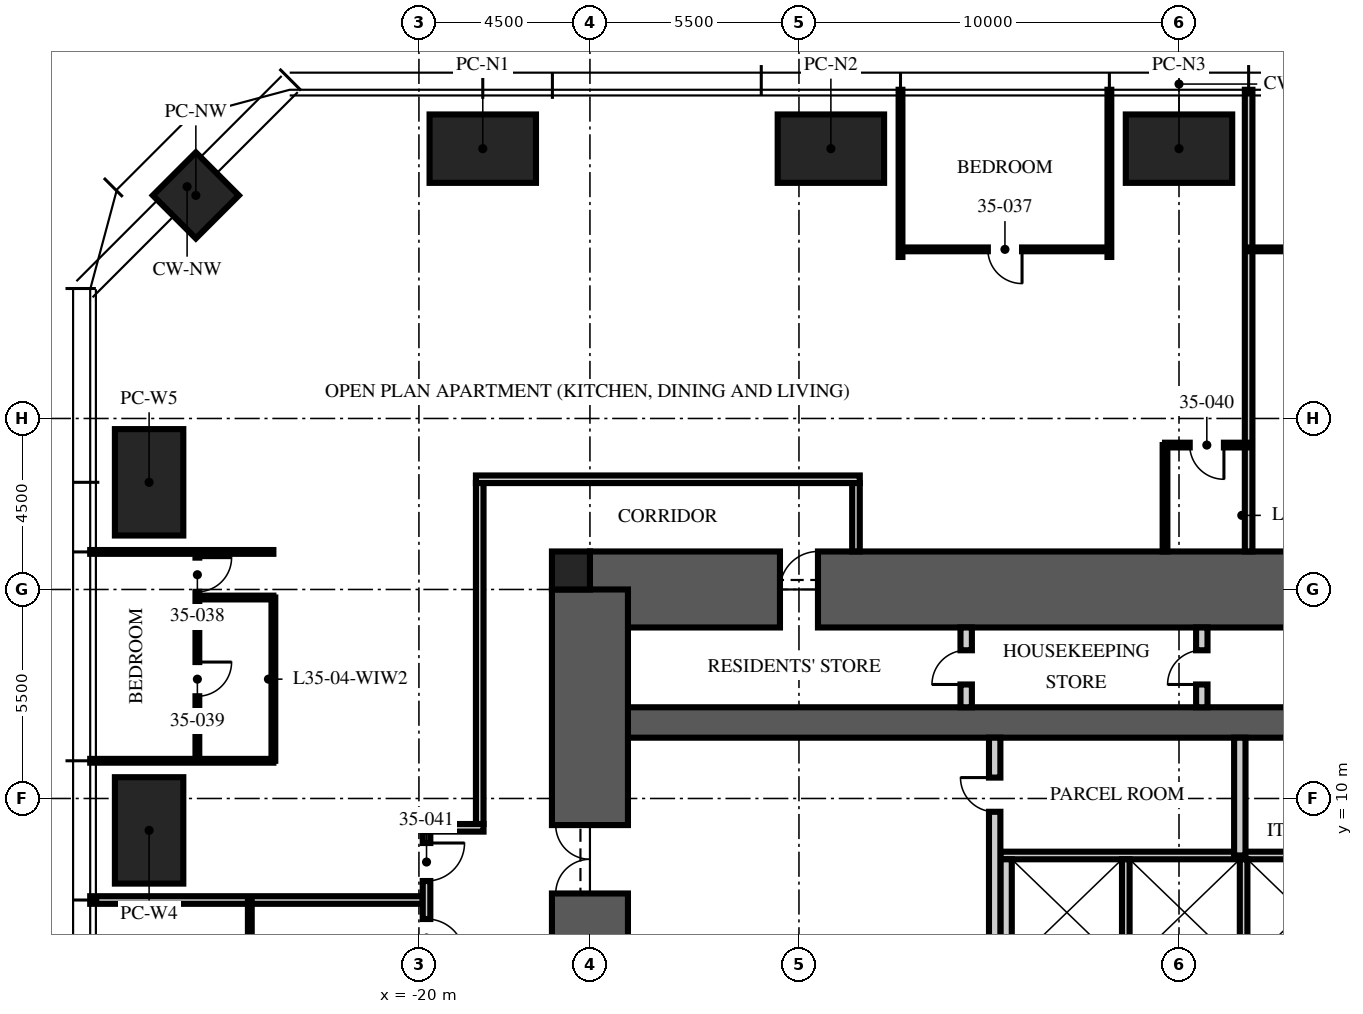
"""IFC4 building model, lengths in metres.
Left out: names, types, materials, properties, quantities, classifications, styles, units other than length and angle.
Written with IfcOpenShell. Run it as: python <this file> out.ifc"""

import sys

from ifc_helpers import new_model, si_unit, direction, frame, frame_2d, origin, origin_2d, place, context, subcontext, project, spatial, rectangle, extrude, element, fill, save


model = new_model("IFC4")
c1 = context("Model", 3, precision=1e-05, world=origin(), true_north=direction((0.0, 1.0)))
c2 = subcontext(c1, "Body", "Model", "MODEL_VIEW")
j1 = project(units=[si_unit("LENGTHUNIT", "METRE"), si_unit("PLANEANGLEUNIT", "RADIAN")], contexts=[c1])
p1 = place(None, origin())
s1 = spatial("IfcSite", under=j1, at=p1, CompositionType="ELEMENT")
p2 = place(p1, origin())
s2 = spatial("IfcBuilding", under=s1, at=p2, CompositionType="ELEMENT")
p3 = place(p2, frame((0.0, 0.0, 141.0)))
s3 = spatial("IfcBuildingStorey", under=s2, at=p3, CompositionType="ELEMENT", Elevation=141.0)
p4 = place(p3, frame((-15.5, 15.5, -0.25), z_axis=(0.0, 0.0, 1.0), x_axis=(1.0, 0.0, 0.0)))
e1 = element("IfcWall", 1, at=p4, inside=s3, PredefinedType="SHEAR", context=c2, shape_type="SweptSolid", body=[
    extrude(rectangle(XDim=31.0, YDim=2.0, at=frame_2d((15.5, 0.0))), origin(), (0.0, 0.0, 1.0), 3.75),
])
p5 = place(p4, frame((5.0, 0.0, 0.25)))
e2 = element("IfcOpeningElement", 2, at=p5, cuts=e1, PredefinedType="OPENING", context=c2, shape_type="SweptSolid", body=[
    extrude(rectangle(XDim=1.0, YDim=2.1, at=frame_2d((0.5, 1.05))), frame((0.0, 1.01, 0.0), z_axis=(0.0, -1.0, 0.0), x_axis=(1.0, 0.0, 0.0)), (0.0, 0.0, 1.0), 2.02),
])
p6 = place(p3, frame((-15.5, 12.0, -0.25), z_axis=(0.0, 0.0, 1.0), x_axis=(1.0, 0.0, 0.0)))
e3 = element("IfcWall", 3, at=p6, inside=s3, PredefinedType="SHEAR", context=c2, shape_type="SweptSolid", body=[
    extrude(rectangle(XDim=31.0, YDim=0.8, at=frame_2d((15.5, 0.0))), origin(), (0.0, 0.0, 1.0), 3.75),
])
p7 = place(p3, frame((-15.5, -15.5, -0.25), z_axis=(0.0, 0.0, 1.0), x_axis=(0.0, 1.0, 0.0)))
e4 = element("IfcWall", 4, at=p7, inside=s3, PredefinedType="SHEAR", context=c2, shape_type="SweptSolid", body=[
    extrude(rectangle(XDim=31.0, YDim=2.0, at=frame_2d((15.5, 0.0))), origin(), (0.0, 0.0, 1.0), 3.75),
])
p8 = place(p7, frame((6.5, 0.0, 0.25)))
e5 = element("IfcOpeningElement", 5, at=p8, cuts=e4, PredefinedType="OPENING", context=c2, shape_type="SweptSolid", body=[
    extrude(rectangle(XDim=1.2, YDim=2.1, at=frame_2d((0.6, 1.05))), frame((0.0, 1.01, 0.0), z_axis=(0.0, -1.0, 0.0), x_axis=(1.0, 0.0, 0.0)), (0.0, 0.0, 1.0), 2.02),
])
p9 = place(p7, frame((23.0, 0.0, 0.25)))
e6 = element("IfcOpeningElement", 6, at=p9, cuts=e4, PredefinedType="OPENING", context=c2, shape_type="SweptSolid", body=[
    extrude(rectangle(XDim=1.8, YDim=2.1, at=frame_2d((0.9, 1.05))), frame((0.0, 1.01, 0.0), z_axis=(0.0, -1.0, 0.0), x_axis=(1.0, 0.0, 0.0)), (0.0, 0.0, 1.0), 2.02),
])
p10 = place(p3, frame((-16.0, 16.0, -0.25), z_axis=(0.0, 0.0, 1.0), x_axis=(1.0, 0.0, 0.0)))
e7 = element("IfcColumn", 7, at=p10, inside=s3, PredefinedType="COLUMN", context=c2, shape_type="SweptSolid", body=[
    extrude(rectangle(XDim=1.0, YDim=1.0, at=origin_2d()), origin(), (0.0, 0.0, 1.0), 3.75),
])
for number, where, z_axis, x_axis in (
    (8, (-18.32, 27.1, 0.0), (0.0, 0.0, 1.0), (1.0, 0.0, 0.0)),
    (9, (-9.16, 27.1, 0.0), (0.0, 0.0, 1.0), (1.0, 0.0, 0.0)),
    (10, (0.0, 27.1, 0.0), (0.0, 0.0, 1.0), (1.0, 0.0, 0.0)),
    (11, (-27.1, 9.16, 0.0), (0.0, 0.0, 1.0), (0.0, 1.0, 0.0)),
    (12, (-27.1, 18.32, 0.0), (0.0, 0.0, 1.0), (0.0, 1.0, 0.0)),
):
    element("IfcColumn", number, at=place(p3, frame(where, z_axis=z_axis, x_axis=x_axis)), inside=s3, PredefinedType="COLUMN", context=c2, shape_type="SweptSolid", body=[
        extrude(rectangle(XDim=2.8, YDim=1.8, at=origin_2d()), origin(), (0.0, 0.0, 1.0), 3.75),
    ])
p11 = place(p3, frame((-25.87, 25.87, 0.0), z_axis=(0.0, 0.0, 1.0), x_axis=(0.707106781187, 0.707106781187, 0.0)))
e13 = element("IfcColumn", 13, at=p11, inside=s3, PredefinedType="COLUMN", context=c2, shape_type="SweptSolid", body=[
    extrude(rectangle(XDim=1.6, YDim=1.6, at=origin_2d()), origin(), (0.0, 0.0, 1.0), 3.75),
])
p12 = place(p3, frame((-4.7, 8.5, 0.0), z_axis=(0.0, 0.0, 1.0), x_axis=(1.0, 0.0, 0.0)))
e14 = element("IfcWall", 14, at=p12, inside=s3, PredefinedType="PARTITIONING", context=c2, shape_type="SweptSolid", body=[
    extrude(rectangle(XDim=9.7, YDim=0.2, at=frame_2d((4.85, 0.0))), origin(), (0.0, 0.0, 1.0), 3.5),
])
p13 = place(p3, frame((-4.55, 5.6, 0.0), z_axis=(0.0, 0.0, 1.0), x_axis=(0.0, 1.0, 0.0)))
e15 = element("IfcWall", 15, at=p13, inside=s3, PredefinedType="PARTITIONING", context=c2, shape_type="SweptSolid", body=[
    extrude(rectangle(XDim=2.8, YDim=0.3, at=frame_2d((1.4, 0.0))), origin(), (0.0, 0.0, 1.0), 3.5),
])
for number, where, z_axis, x_axis in (
    (16, (-1.4, 5.6, 0.0), (0.0, 0.0, 1.0), (0.0, 1.0, 0.0)),
    (17, (1.7, 5.6, 0.0), (0.0, 0.0, 1.0), (0.0, 1.0, 0.0)),
):
    element("IfcWall", number, at=place(p3, frame(where, z_axis=z_axis, x_axis=x_axis)), inside=s3, PredefinedType="PARTITIONING", context=c2, shape_type="SweptSolid", body=[
        extrude(rectangle(XDim=2.8, YDim=0.2, at=frame_2d((1.4, 0.0))), origin(), (0.0, 0.0, 1.0), 3.5),
    ])
p14 = place(p3, frame((-4.85, 5.3, 0.0), z_axis=(0.0, 0.0, 1.0), x_axis=(0.0, 1.0, 0.0)))
e18 = element("IfcWall", 18, at=p14, inside=s3, PredefinedType="PARTITIONING", context=c2, shape_type="SweptSolid", body=[
    extrude(rectangle(XDim=6.3, YDim=0.3, at=frame_2d((3.15, 0.0))), origin(), (0.0, 0.0, 1.0), 3.5),
])
p15 = place(p14, frame((4.35, 0.0, 0.0)))
e19 = element("IfcOpeningElement", 19, at=p15, cuts=e18, PredefinedType="OPENING", context=c2, shape_type="SweptSolid", body=[
    extrude(rectangle(XDim=0.9, YDim=2.1, at=frame_2d((0.45, 1.05))), frame((0.0, 0.16, 0.0), z_axis=(0.0, -1.0, 0.0), x_axis=(1.0, 0.0, 0.0)), (0.0, 0.0, 1.0), 0.32),
])
p16 = place(p3, frame((1.6, 8.5, 0.0), z_axis=(0.0, 0.0, 1.0), x_axis=(0.0, 1.0, 0.0)))
e20 = element("IfcWall", 20, at=p16, inside=s3, PredefinedType="PARTITIONING", context=c2, shape_type="SweptSolid", body=[
    extrude(rectangle(XDim=3.1, YDim=0.3, at=frame_2d((1.55, 0.0))), origin(), (0.0, 0.0, 1.0), 3.5),
])
p17 = place(p3, frame((-5.6, 12.4, 0.0), z_axis=(0.0, 0.0, 1.0), x_axis=(0.0, 1.0, 0.0)))
e21 = element("IfcWall", 21, at=p17, inside=s3, PredefinedType="PARTITIONING", context=c2, shape_type="SweptSolid", body=[
    extrude(rectangle(XDim=2.1, YDim=0.3, at=frame_2d((1.05, 0.0))), origin(), (0.0, 0.0, 1.0), 3.5),
])
p18 = place(p17, frame((0.6, 0.0, 0.0)))
e22 = element("IfcOpeningElement", 22, at=p18, cuts=e21, PredefinedType="OPENING", context=c2, shape_type="SweptSolid", body=[
    extrude(rectangle(XDim=0.9, YDim=2.1, at=frame_2d((0.45, 1.05))), frame((0.0, 0.16, 0.0), z_axis=(0.0, -1.0, 0.0), x_axis=(1.0, 0.0, 0.0)), (0.0, 0.0, 1.0), 0.32),
])
p19 = place(p3, frame((0.6, 12.4, 0.0), z_axis=(0.0, 0.0, 1.0), x_axis=(0.0, 1.0, 0.0)))
e23 = element("IfcWall", 23, at=p19, inside=s3, PredefinedType="PARTITIONING", context=c2, shape_type="SweptSolid", body=[
    extrude(rectangle(XDim=2.1, YDim=0.3, at=frame_2d((1.05, 0.0))), origin(), (0.0, 0.0, 1.0), 3.5),
])
p20 = place(p19, frame((0.6, 0.0, 0.0)))
e24 = element("IfcOpeningElement", 24, at=p20, cuts=e23, PredefinedType="OPENING", context=c2, shape_type="SweptSolid", body=[
    extrude(rectangle(XDim=0.9, YDim=2.1, at=frame_2d((0.45, 1.05))), frame((0.0, 0.16, 0.0), z_axis=(0.0, -1.0, 0.0), x_axis=(1.0, 0.0, 0.0)), (0.0, 0.0, 1.0), 0.32),
])
p21 = place(p3, frame((-18.5, 18.4, 0.0), z_axis=(0.0, 0.0, 1.0), x_axis=(1.0, 0.0, 0.0)))
e25 = element("IfcWall", 25, at=p21, inside=s3, PredefinedType="PARTITIONING", context=c2, shape_type="SweptSolid", body=[
    extrude(rectangle(XDim=10.1, YDim=0.2, at=frame_2d((5.05, 0.0))), origin(), (0.0, 0.0, 1.0), 2.3),
])
p22 = place(p3, frame((-8.5, 18.3, 0.0), z_axis=(0.0, 0.0, 1.0), x_axis=(0.0, -1.0, 0.0)))
e26 = element("IfcWall", 26, at=p22, inside=s3, PredefinedType="PARTITIONING", context=c2, shape_type="SweptSolid", body=[
    extrude(rectangle(XDim=1.8, YDim=0.2, at=frame_2d((0.9, 0.0))), origin(), (0.0, 0.0, 1.0), 3.5),
])
p23 = place(p3, frame((1.832, 16.5, 0.0), z_axis=(0.0, 0.0, 1.0), x_axis=(0.0, 1.0, 0.0)))
e27 = element("IfcWall", 27, at=p23, inside=s3, PredefinedType="PARTITIONING", context=c2, shape_type="SweptSolid", body=[
    extrude(rectangle(XDim=12.15, YDim=0.2, at=frame_2d((6.075, 0.0))), origin(), (0.0, 0.0, 1.0), 2.81),
])
for number, where, z_axis, x_axis in (
    (28, (-1.832, 24.25, 0.0), (0.0, 0.0, 1.0), (0.0, 1.0, 0.0)),
    (29, (-7.328, 24.25, 0.0), (0.0, 0.0, 1.0), (0.0, 1.0, 0.0)),
):
    element("IfcWall", number, at=place(p3, frame(where, z_axis=z_axis, x_axis=x_axis)), inside=s3, PredefinedType="PARTITIONING", context=c2, shape_type="SweptSolid", body=[
        extrude(rectangle(XDim=4.4, YDim=0.1, at=frame_2d((2.2, 0.0))), origin(), (0.0, 0.0, 1.0), 2.81),
    ])
for number, where, z_axis, x_axis in (
    (30, (-23.83, 16.488, 0.0), (0.0, 0.0, 1.0), (-1.0, 0.0, 0.0)),
    (31, (-23.83, 10.992, 0.0), (0.0, 0.0, 1.0), (-1.0, 0.0, 0.0)),
):
    element("IfcWall", number, at=place(p3, frame(where, z_axis=z_axis, x_axis=x_axis)), inside=s3, PredefinedType="PARTITIONING", context=c2, shape_type="SweptSolid", body=[
        extrude(rectangle(XDim=4.82, YDim=0.1, at=frame_2d((2.41, 0.0))), origin(), (0.0, 0.0, 1.0), 2.81),
    ])
p24 = place(p3, frame((-19.9, 7.328, 0.0), z_axis=(0.0, 0.0, 1.0), x_axis=(-1.0, 0.0, 0.0)))
e32 = element("IfcWall", 32, at=p24, inside=s3, PredefinedType="PARTITIONING", context=c2, shape_type="SweptSolid", body=[
    extrude(rectangle(XDim=8.75, YDim=0.2, at=frame_2d((4.375, 0.0))), origin(), (0.0, 0.0, 1.0), 2.81),
])
p25 = place(p3, frame((7.328, 24.45, 0.0), z_axis=(0.0, 0.0, 1.0), x_axis=(-1.0, 0.0, 0.0)))
e33 = element("IfcWall", 33, at=p25, inside=s3, PredefinedType="PARTITIONING", context=c2, shape_type="SweptSolid", body=[
    extrude(rectangle(XDim=5.496, YDim=0.1, at=frame_2d((2.748, 0.0))), origin(), (0.0, 0.0, 1.0), 2.81),
])
p26 = place(p25, frame((2.298, 0.0, 0.0)))
e34 = element("IfcOpeningElement", 34, at=p26, cuts=e33, PredefinedType="OPENING", context=c2, shape_type="SweptSolid", body=[
    extrude(rectangle(XDim=0.9, YDim=2.1, at=frame_2d((0.45, 1.05))), frame((0.0, 0.06, 0.0), z_axis=(0.0, -1.0, 0.0), x_axis=(1.0, 0.0, 0.0)), (0.0, 0.0, 1.0), 0.12),
])
p27 = place(p3, frame((-1.832, 24.45, 0.0), z_axis=(0.0, 0.0, 1.0), x_axis=(-1.0, 0.0, 0.0)))
e35 = element("IfcWall", 35, at=p27, inside=s3, PredefinedType="PARTITIONING", context=c2, shape_type="SweptSolid", body=[
    extrude(rectangle(XDim=5.496, YDim=0.1, at=frame_2d((2.748, 0.0))), origin(), (0.0, 0.0, 1.0), 2.81),
])
p28 = place(p27, frame((2.298, 0.0, 0.0)))
e36 = element("IfcOpeningElement", 36, at=p28, cuts=e35, PredefinedType="OPENING", context=c2, shape_type="SweptSolid", body=[
    extrude(rectangle(XDim=0.9, YDim=2.1, at=frame_2d((0.45, 1.05))), frame((0.0, 0.06, 0.0), z_axis=(0.0, -1.0, 0.0), x_axis=(1.0, 0.0, 0.0)), (0.0, 0.0, 1.0), 0.12),
])
p29 = place(p3, frame((-25.83, 16.488, 0.0), z_axis=(0.0, 0.0, 1.0), x_axis=(0.0, -1.0, 0.0)))
e37 = element("IfcWall", 37, at=p29, inside=s3, PredefinedType="PARTITIONING", context=c2, shape_type="SweptSolid", body=[
    extrude(rectangle(XDim=5.496, YDim=0.1, at=frame_2d((2.748, 0.0))), origin(), (0.0, 0.0, 1.0), 2.81),
])
p30 = place(p29, frame((0.15, 0.0, 0.0)))
e38 = element("IfcOpeningElement", 38, at=p30, cuts=e37, PredefinedType="OPENING", context=c2, shape_type="SweptSolid", body=[
    extrude(rectangle(XDim=0.9, YDim=2.1, at=frame_2d((0.45, 1.05))), frame((0.0, 0.06, 0.0), z_axis=(0.0, -1.0, 0.0), x_axis=(1.0, 0.0, 0.0)), (0.0, 0.0, 1.0), 0.12),
])
p31 = place(p29, frame((2.898, 0.0, 0.0)))
e39 = element("IfcOpeningElement", 39, at=p31, cuts=e37, PredefinedType="OPENING", context=c2, shape_type="SweptSolid", body=[
    extrude(rectangle(XDim=0.9, YDim=2.1, at=frame_2d((0.45, 1.05))), frame((0.0, 0.06, 0.0), z_axis=(0.0, -1.0, 0.0), x_axis=(1.0, 0.0, 0.0)), (0.0, 0.0, 1.0), 0.12),
])
p32 = place(p3, frame((-23.83, 15.288, 0.0), z_axis=(0.0, 0.0, 1.0), x_axis=(-1.0, 0.0, 0.0)))
e40 = element("IfcWall", 40, at=p32, inside=s3, PredefinedType="PARTITIONING", context=c2, shape_type="SweptSolid", body=[
    extrude(rectangle(XDim=2.0, YDim=0.1, at=frame_2d((1.0, 0.0))), origin(), (0.0, 0.0, 1.0), 3.5),
])
p33 = place(p3, frame((-23.83, 15.288, 0.0), z_axis=(0.0, 0.0, 1.0), x_axis=(0.0, -1.0, 0.0)))
e41 = element("IfcWall", 41, at=p33, inside=s3, PredefinedType="PARTITIONING", context=c2, shape_type="SweptSolid", body=[
    extrude(rectangle(XDim=4.296, YDim=0.1, at=frame_2d((2.148, 0.0))), origin(), (0.0, 0.0, 1.0), 2.81),
])
p34 = place(p3, frame((1.832, 19.3, 0.0), z_axis=(0.0, 0.0, 1.0), x_axis=(-1.0, 0.0, 0.0)))
e42 = element("IfcWall", 42, at=p34, inside=s3, PredefinedType="PARTITIONING", context=c2, shape_type="SweptSolid", body=[
    extrude(rectangle(XDim=2.2, YDim=0.125, at=frame_2d((1.1, 0.0))), origin(), (0.0, 0.0, 1.0), 2.7),
])
p35 = place(p34, frame((0.65, 0.0, 0.0)))
e43 = element("IfcOpeningElement", 43, at=p35, cuts=e42, PredefinedType="OPENING", context=c2, shape_type="SweptSolid", body=[
    extrude(rectangle(XDim=0.9, YDim=2.1, at=frame_2d((0.45, 1.05))), frame((0.0, 0.073, 0.0), z_axis=(0.0, -1.0, 0.0), x_axis=(1.0, 0.0, 0.0)), (0.0, 0.0, 1.0), 0.145),
])
p36 = place(p3, frame((-0.368, 16.5, 0.0), z_axis=(0.0, 0.0, 1.0), x_axis=(0.0, 1.0, 0.0)))
e44 = element("IfcWall", 44, at=p36, inside=s3, PredefinedType="PARTITIONING", context=c2, shape_type="SweptSolid", body=[
    extrude(rectangle(XDim=2.8, YDim=0.125, at=frame_2d((1.4, 0.0))), origin(), (0.0, 0.0, 1.0), 3.5),
])
p37 = place(p3, frame((-24.45, 7.328, 0.0), z_axis=(0.0, 0.0, 1.0), x_axis=(0.0, -1.0, 0.0)))
e45 = element("IfcWall", 45, at=p37, inside=s3, PredefinedType="PARTITIONING", context=c2, shape_type="SweptSolid", body=[
    extrude(rectangle(XDim=5.496, YDim=0.1, at=frame_2d((2.748, 0.0))), origin(), (0.0, 0.0, 1.0), 2.81),
])
p38 = place(p37, frame((2.298, 0.0, 0.0)))
e46 = element("IfcOpeningElement", 46, at=p38, cuts=e45, PredefinedType="OPENING", context=c2, shape_type="SweptSolid", body=[
    extrude(rectangle(XDim=0.9, YDim=2.1, at=frame_2d((0.45, 1.05))), frame((0.0, 0.06, 0.0), z_axis=(0.0, -1.0, 0.0), x_axis=(1.0, 0.0, 0.0)), (0.0, 0.0, 1.0), 0.12),
])
p39 = place(p3, frame((-18.4, 18.3, 0.0), z_axis=(0.0, 0.0, 1.0), x_axis=(0.0, -1.0, 0.0)))
e47 = element("IfcWall", 47, at=p39, inside=s3, PredefinedType="PARTITIONING", context=c2, shape_type="SweptSolid", body=[
    extrude(rectangle(XDim=8.972, YDim=0.2, at=frame_2d((4.486, 0.0))), origin(), (0.0, 0.0, 1.0), 2.3),
])
p40 = place(p3, frame((-18.3, 9.228, 0.0), z_axis=(0.0, 0.0, 1.0), x_axis=(-1.0, 0.0, 0.0)))
e48 = element("IfcWall", 48, at=p40, inside=s3, PredefinedType="PARTITIONING", context=c2, shape_type="SweptSolid", body=[
    extrude(rectangle(XDim=1.6, YDim=0.2, at=frame_2d((0.8, 0.0))), origin(), (0.0, 0.0, 1.0), 2.7),
])
p41 = place(p3, frame((-19.8, 9.128, 0.0), z_axis=(0.0, 0.0, 1.0), x_axis=(0.0, -1.0, 0.0)))
e49 = element("IfcWall", 49, at=p41, inside=s3, PredefinedType="PARTITIONING", context=c2, shape_type="SweptSolid", body=[
    extrude(rectangle(XDim=3.6, YDim=0.2, at=frame_2d((1.8, 0.0))), origin(), (0.0, 0.0, 1.0), 2.7),
])
p42 = place(p41, frame((0.3, 0.0, 0.0)))
e50 = element("IfcOpeningElement", 50, at=p42, cuts=e49, PredefinedType="OPENING", context=c2, shape_type="SweptSolid", body=[
    extrude(rectangle(XDim=1.0, YDim=2.2, at=frame_2d((0.5, 1.1))), frame((0.0, 0.11, 0.0), z_axis=(0.0, -1.0, 0.0), x_axis=(1.0, 0.0, 0.0)), (0.0, 0.0, 1.0), 0.22),
])
p43 = place(p41, frame((2.3, 0.0, 0.0)))
e51 = element("IfcOpeningElement", 51, at=p43, cuts=e49, PredefinedType="OPENING", context=c2, shape_type="SweptSolid", body=[
    extrude(rectangle(XDim=1.0, YDim=2.2, at=frame_2d((0.5, 1.1))), frame((0.0, 0.11, 0.0), z_axis=(0.0, -1.0, 0.0), x_axis=(1.0, 0.0, 0.0)), (0.0, 0.0, 1.0), 0.22),
])
p44 = place(p9, origin())
e52 = element("IfcDoor", 52, at=p44, inside=s3, OperationType="DOUBLE_DOOR_SINGLE_SWING", PredefinedType="DOOR", context=c2, shape_type="SweptSolid", body=[
    extrude(rectangle(XDim=1.8, YDim=2.1, at=frame_2d((0.9, 1.05))), frame((0.0, 0.025, 0.0), z_axis=(0.0, -1.0, 0.0), x_axis=(1.0, 0.0, 0.0)), (0.0, 0.0, 1.0), 0.05),
])
fill(e6, e52)
p45 = place(p15, origin())
e53 = element("IfcDoor", 53, at=p45, inside=s3, OperationType="SINGLE_SWING_RIGHT", PredefinedType="DOOR", context=c2, shape_type="SweptSolid", body=[
    extrude(rectangle(XDim=0.9, YDim=2.1, at=frame_2d((0.45, 1.05))), frame((0.0, 0.025, 0.0), z_axis=(0.0, -1.0, 0.0), x_axis=(1.0, 0.0, 0.0)), (0.0, 0.0, 1.0), 0.05),
])
fill(e19, e53)
p46 = place(p18, origin())
e54 = element("IfcDoor", 54, at=p46, inside=s3, OperationType="SINGLE_SWING_LEFT", PredefinedType="DOOR", context=c2, shape_type="SweptSolid", body=[
    extrude(rectangle(XDim=0.9, YDim=2.1, at=frame_2d((0.45, 1.05))), frame((0.0, 0.025, 0.0), z_axis=(0.0, -1.0, 0.0), x_axis=(1.0, 0.0, 0.0)), (0.0, 0.0, 1.0), 0.05),
])
fill(e22, e54)
p47 = place(p20, origin())
e55 = element("IfcDoor", 55, at=p47, inside=s3, OperationType="SINGLE_SWING_LEFT", PredefinedType="DOOR", context=c2, shape_type="SweptSolid", body=[
    extrude(rectangle(XDim=0.9, YDim=2.1, at=frame_2d((0.45, 1.05))), frame((0.0, 0.025, 0.0), z_axis=(0.0, -1.0, 0.0), x_axis=(1.0, 0.0, 0.0)), (0.0, 0.0, 1.0), 0.05),
])
fill(e24, e55)
p48 = place(p5, origin())
e56 = element("IfcDoor", 56, at=p48, inside=s3, OperationType="SINGLE_SWING_RIGHT", PredefinedType="DOOR", context=c2, shape_type="SweptSolid", body=[
    extrude(rectangle(XDim=1.0, YDim=2.1, at=frame_2d((0.5, 1.05))), frame((0.0, 0.025, 0.0), z_axis=(0.0, -1.0, 0.0), x_axis=(1.0, 0.0, 0.0)), (0.0, 0.0, 1.0), 0.05),
])
fill(e2, e56)
p49 = place(p28, origin())
e57 = element("IfcDoor", 57, at=p49, inside=s3, OperationType="SINGLE_SWING_LEFT", PredefinedType="DOOR", context=c2, shape_type="SweptSolid", body=[
    extrude(rectangle(XDim=0.9, YDim=2.1, at=frame_2d((0.45, 1.05))), frame((0.0, 0.025, 0.0), z_axis=(0.0, -1.0, 0.0), x_axis=(1.0, 0.0, 0.0)), (0.0, 0.0, 1.0), 0.05),
])
fill(e36, e57)
p50 = place(p30, origin())
e58 = element("IfcDoor", 58, at=p50, inside=s3, OperationType="SINGLE_SWING_LEFT", PredefinedType="DOOR", context=c2, shape_type="SweptSolid", body=[
    extrude(rectangle(XDim=0.9, YDim=2.1, at=frame_2d((0.45, 1.05))), frame((0.0, 0.025, 0.0), z_axis=(0.0, -1.0, 0.0), x_axis=(1.0, 0.0, 0.0)), (0.0, 0.0, 1.0), 0.05),
])
fill(e38, e58)
p51 = place(p31, origin())
e59 = element("IfcDoor", 59, at=p51, inside=s3, OperationType="SINGLE_SWING_LEFT", PredefinedType="DOOR", context=c2, shape_type="SweptSolid", body=[
    extrude(rectangle(XDim=0.9, YDim=2.1, at=frame_2d((0.45, 1.05))), frame((0.0, 0.025, 0.0), z_axis=(0.0, -1.0, 0.0), x_axis=(1.0, 0.0, 0.0)), (0.0, 0.0, 1.0), 0.05),
])
fill(e39, e59)
p52 = place(p35, origin())
e60 = element("IfcDoor", 60, at=p52, inside=s3, OperationType="SINGLE_SWING_LEFT", PredefinedType="DOOR", context=c2, shape_type="SweptSolid", body=[
    extrude(rectangle(XDim=0.9, YDim=2.1, at=frame_2d((0.45, 1.05))), frame((0.0, 0.025, 0.0), z_axis=(0.0, -1.0, 0.0), x_axis=(1.0, 0.0, 0.0)), (0.0, 0.0, 1.0), 0.05),
])
fill(e43, e60)
p53 = place(p42, origin())
e61 = element("IfcDoor", 61, at=p53, inside=s3, OperationType="SINGLE_SWING_LEFT", PredefinedType="DOOR", context=c2, shape_type="SweptSolid", body=[
    extrude(rectangle(XDim=1.0, YDim=2.2, at=frame_2d((0.5, 1.1))), frame((0.0, 0.025, 0.0), z_axis=(0.0, -1.0, 0.0), x_axis=(1.0, 0.0, 0.0)), (0.0, 0.0, 1.0), 0.05),
])
fill(e50, e61)
p54 = place(p43, origin())
e62 = element("IfcDoor", 62, at=p54, inside=s3, OperationType="SINGLE_SWING_RIGHT", PredefinedType="DOOR", context=c2, shape_type="SweptSolid", body=[
    extrude(rectangle(XDim=1.0, YDim=2.2, at=frame_2d((0.5, 1.1))), frame((0.0, 0.025, 0.0), z_axis=(0.0, -1.0, 0.0), x_axis=(1.0, 0.0, 0.0)), (0.0, 0.0, 1.0), 0.05),
])
fill(e51, e62)
save(model, sys.argv[1])
